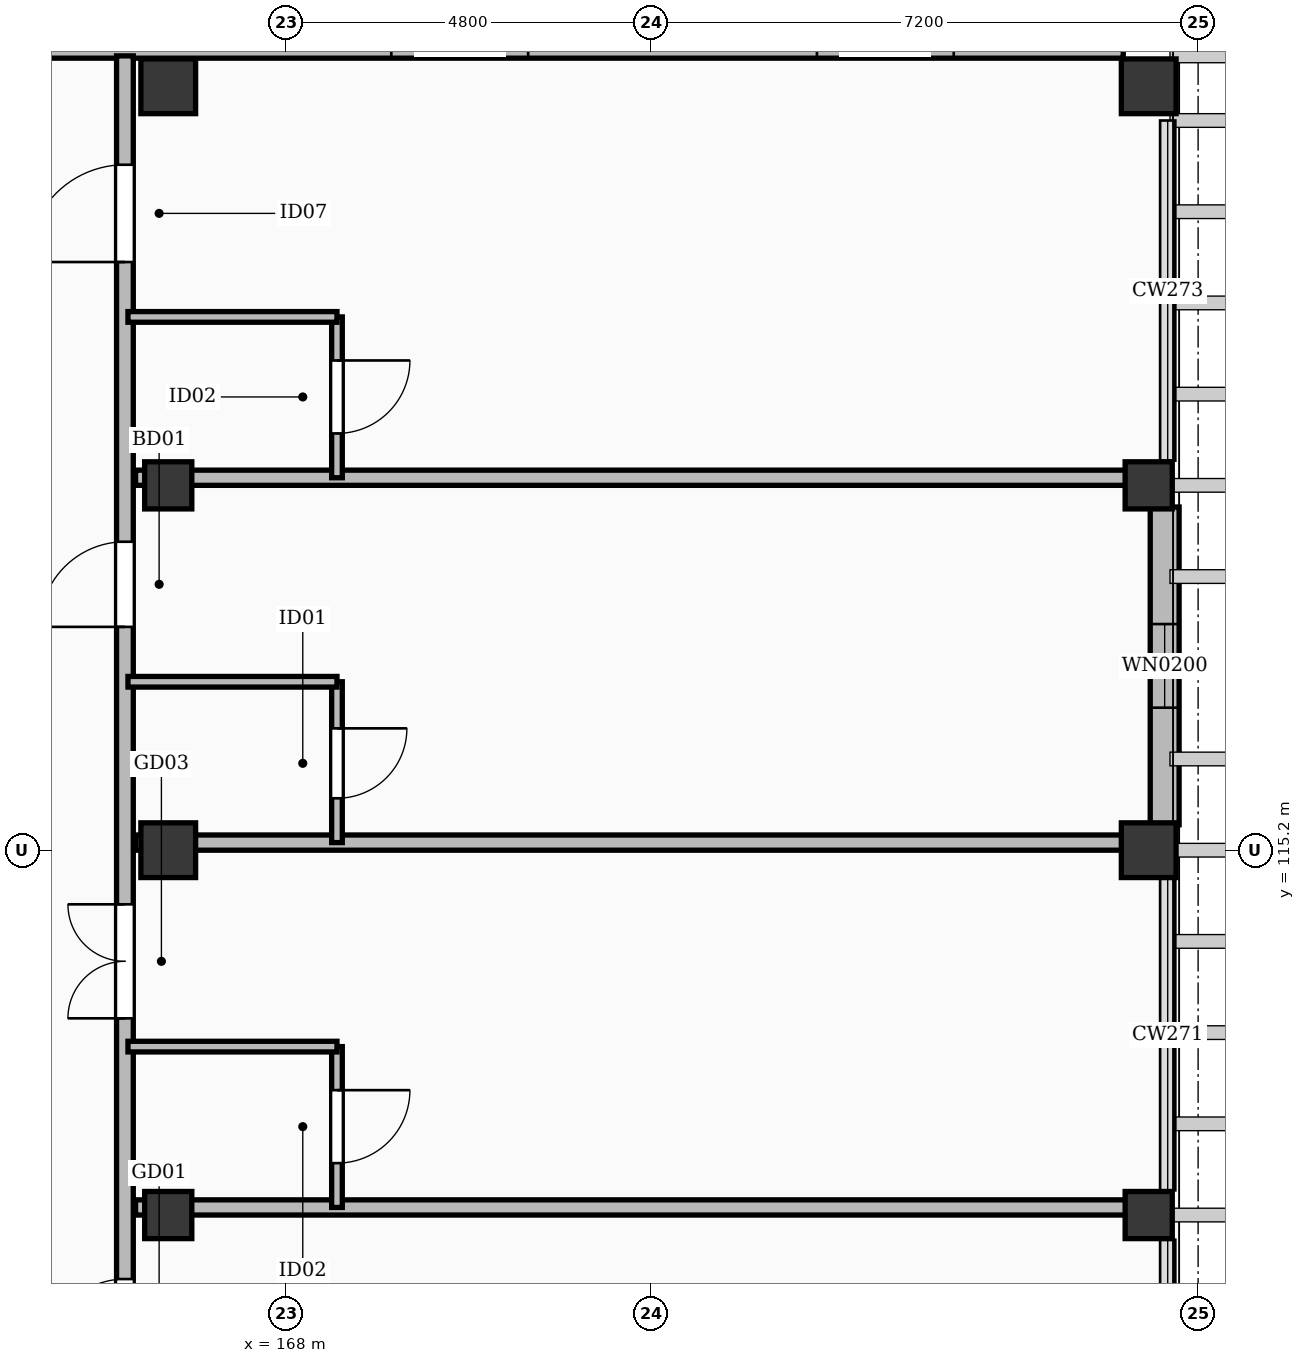
"""IFC4 building model, lengths in metres.
Left out: names, types, materials, properties, quantities, classifications, styles, units other than length and angle.
Written with IfcOpenShell. Run it as: python <this file> out.ifc"""

import sys

from ifc_helpers import new_model, si_unit, direction, frame, frame_2d, origin, origin_2d, place, context, subcontext, project, spatial, rectangle, extrude, element, fill, save


model = new_model("IFC4")
c1 = context("Model", 3, precision=1e-05, world=origin(), true_north=direction((0.0, 1.0)))
c2 = subcontext(c1, "Body", "Model", "MODEL_VIEW")
j1 = project(units=[si_unit("LENGTHUNIT", "METRE"), si_unit("PLANEANGLEUNIT", "RADIAN")], contexts=[c1])
p1 = place(None, origin())
s1 = spatial("IfcSite", under=j1, at=p1, CompositionType="ELEMENT")
p2 = place(p1, origin())
s2 = spatial("IfcBuilding", under=s1, at=p2, CompositionType="ELEMENT")
p3 = place(p2, frame((0.0, 0.0, 31.8)))
s3 = spatial("IfcBuildingStorey", under=s2, at=p3, CompositionType="ELEMENT", Elevation=31.8)
for number, where, z_axis, x_axis in (
    (1, (166.45, 115.2, 0.0), (0.0, 0.0, 1.0), (1.0, 0.0, 0.0)),
    (2, (166.45, 125.25, 0.0), (0.0, 0.0, 1.0), (1.0, 0.0, 0.0)),
    (3, (179.35, 115.2, 0.0), (0.0, 0.0, 1.0), (1.0, 0.0, 0.0)),
    (4, (179.35, 125.25, 0.0), (0.0, 0.0, 1.0), (1.0, 0.0, 0.0)),
):
    element("IfcColumn", number, at=place(p3, frame(where, z_axis=z_axis, x_axis=x_axis)), inside=s3, PredefinedType="COLUMN", context=c2, shape_type="SweptSolid", body=[
        extrude(rectangle(XDim=0.72, YDim=0.72, at=origin_2d()), origin(), (0.0, 0.0, 1.0), 3.6),
    ])
for number, where, z_axis, x_axis in (
    (5, (166.45, 110.4, 0.0), (0.0, 0.0, 1.0), (1.0, 0.0, 0.0)),
    (6, (166.45, 120.0, 0.0), (0.0, 0.0, 1.0), (1.0, 0.0, 0.0)),
    (7, (179.35, 110.4, 0.0), (0.0, 0.0, 1.0), (1.0, 0.0, 0.0)),
    (8, (179.35, 120.0, 0.0), (0.0, 0.0, 1.0), (1.0, 0.0, 0.0)),
):
    element("IfcColumn", number, at=place(p3, frame(where, z_axis=z_axis, x_axis=x_axis)), inside=s3, PredefinedType="COLUMN", context=c2, shape_type="SweptSolid", body=[
        extrude(rectangle(XDim=0.62, YDim=0.62, at=origin_2d()), origin(), (0.0, 0.0, 1.0), 3.6),
    ])
p4 = place(p3, frame((149.785, 125.81, 0.0), z_axis=(0.0, 0.0, 1.0), x_axis=(1.0, 0.0, 0.0)))
e9 = element("IfcWall", 9, at=p4, inside=s3, PredefinedType="SOLIDWALL", context=c2, shape_type="SweptSolid", body=[
    extrude(rectangle(XDim=29.23, YDim=0.38, at=frame_2d((14.615, 0.0))), origin(), (0.0, 0.0, 1.0), 3.36),
])
p5 = place(p4, frame((3.6, 0.0, 0.55)))
e10 = element("IfcOpeningElement", 10, at=p5, cuts=e9, PredefinedType="OPENING", context=c2, shape_type="SweptSolid", body=[
    extrude(rectangle(XDim=1.8, YDim=1.76, at=frame_2d((0.9, 0.88))), frame((0.0, 0.202, 0.0), z_axis=(0.0, -1.0, 0.0), x_axis=(1.0, 0.0, 0.0)), (0.0, 0.0, 1.0), 0.404),
])
p6 = place(p4, frame((9.2, 0.0, 0.55)))
e11 = element("IfcOpeningElement", 11, at=p6, cuts=e9, PredefinedType="OPENING", context=c2, shape_type="SweptSolid", body=[
    extrude(rectangle(XDim=1.8, YDim=1.76, at=frame_2d((0.9, 0.88))), frame((0.0, 0.202, 0.0), z_axis=(0.0, -1.0, 0.0), x_axis=(1.0, 0.0, 0.0)), (0.0, 0.0, 1.0), 0.404),
])
p7 = place(p4, frame((19.6, 0.0, 0.55)))
e12 = element("IfcOpeningElement", 12, at=p7, cuts=e9, PredefinedType="OPENING", context=c2, shape_type="SweptSolid", body=[
    extrude(rectangle(XDim=1.8, YDim=1.76, at=frame_2d((0.9, 0.88))), frame((0.0, 0.202, 0.0), z_axis=(0.0, -1.0, 0.0), x_axis=(1.0, 0.0, 0.0)), (0.0, 0.0, 1.0), 0.404),
])
p8 = place(p4, frame((25.2, 0.0, 0.55)))
e13 = element("IfcOpeningElement", 13, at=p8, cuts=e9, PredefinedType="OPENING", context=c2, shape_type="SweptSolid", body=[
    extrude(rectangle(XDim=1.8, YDim=1.76, at=frame_2d((0.9, 0.88))), frame((0.0, 0.202, 0.0), z_axis=(0.0, -1.0, 0.0), x_axis=(1.0, 0.0, 0.0)), (0.0, 0.0, 1.0), 0.404),
])
p9 = place(p3, frame((179.56, 119.715, 0.0), z_axis=(0.0, 0.0, 1.0), x_axis=(0.0, -1.0, 0.0)))
e14 = element("IfcWall", 14, at=p9, inside=s3, PredefinedType="SOLIDWALL", context=c2, shape_type="SweptSolid", body=[
    extrude(rectangle(XDim=4.18, YDim=0.38, at=frame_2d((2.09, 0.0))), origin(), (0.0, 0.0, 1.0), 2.602),
])
p10 = place(p9, frame((1.54, 0.0, 0.55)))
e15 = element("IfcOpeningElement", 15, at=p10, cuts=e14, PredefinedType="OPENING", context=c2, shape_type="SweptSolid", body=[
    extrude(rectangle(XDim=1.1, YDim=1.7, at=frame_2d((0.55, 0.85))), frame((0.0, 0.202, 0.0), z_axis=(0.0, -1.0, 0.0), x_axis=(1.0, 0.0, 0.0)), (0.0, 0.0, 1.0), 0.404),
])
p11 = place(p3, frame((165.88, 48.35, 0.0), z_axis=(0.0, 0.0, 1.0), x_axis=(0.0, 1.0, 0.0)))
e16 = element("IfcWall", 16, at=p11, inside=s3, PredefinedType="PARTITIONING", context=c2, shape_type="SweptSolid", body=[
    extrude(rectangle(XDim=77.3, YDim=0.22, at=frame_2d((38.65, 0.0))), origin(), (0.0, 0.0, 1.0), 2.602),
])
p12 = place(p11, frame((5.15, 0.0, 0.0)))
e17 = element("IfcOpeningElement", 17, at=p12, cuts=e16, PredefinedType="OPENING", context=c2, shape_type="SweptSolid", body=[
    extrude(rectangle(XDim=1.14, YDim=2.26, at=frame_2d((0.57, 1.13))), frame((0.0, 0.122, 0.0), z_axis=(0.0, -1.0, 0.0), x_axis=(1.0, 0.0, 0.0)), (0.0, 0.0, 1.0), 0.244),
])
p13 = place(p11, frame((12.188, 0.0, 0.0)))
e18 = element("IfcOpeningElement", 18, at=p13, cuts=e16, PredefinedType="OPENING", context=c2, shape_type="SweptSolid", body=[
    extrude(rectangle(XDim=1.12, YDim=2.15, at=frame_2d((0.56, 1.075))), frame((0.0, 0.122, 0.0), z_axis=(0.0, -1.0, 0.0), x_axis=(1.0, 0.0, 0.0)), (0.0, 0.0, 1.0), 0.244),
])
p14 = place(p11, frame((16.988, 0.0, 0.0)))
e19 = element("IfcOpeningElement", 19, at=p14, cuts=e16, PredefinedType="OPENING", context=c2, shape_type="SweptSolid", body=[
    extrude(rectangle(XDim=1.28, YDim=2.16, at=frame_2d((0.64, 1.08))), frame((0.0, 0.122, 0.0), z_axis=(0.0, -1.0, 0.0), x_axis=(1.0, 0.0, 0.0)), (0.0, 0.0, 1.0), 0.244),
])
p15 = place(p11, frame((21.788, 0.0, 0.0)))
e20 = element("IfcOpeningElement", 20, at=p15, cuts=e16, PredefinedType="OPENING", context=c2, shape_type="SweptSolid", body=[
    extrude(rectangle(XDim=1.05, YDim=2.18, at=frame_2d((0.525, 1.09))), frame((0.0, 0.122, 0.0), z_axis=(0.0, -1.0, 0.0), x_axis=(1.0, 0.0, 0.0)), (0.0, 0.0, 1.0), 0.244),
])
p16 = place(p11, frame((26.588, 0.0, 0.0)))
e21 = element("IfcOpeningElement", 21, at=p16, cuts=e16, PredefinedType="OPENING", context=c2, shape_type="SweptSolid", body=[
    extrude(rectangle(XDim=1.08, YDim=2.25, at=frame_2d((0.54, 1.125))), frame((0.0, 0.122, 0.0), z_axis=(0.0, -1.0, 0.0), x_axis=(1.0, 0.0, 0.0)), (0.0, 0.0, 1.0), 0.244),
])
p17 = place(p11, frame((31.388, 0.0, 0.0)))
e22 = element("IfcOpeningElement", 22, at=p17, cuts=e16, PredefinedType="OPENING", context=c2, shape_type="SweptSolid", body=[
    extrude(rectangle(XDim=1.02, YDim=2.2, at=frame_2d((0.51, 1.1))), frame((0.0, 0.122, 0.0), z_axis=(0.0, -1.0, 0.0), x_axis=(1.0, 0.0, 0.0)), (0.0, 0.0, 1.0), 0.244),
])
p18 = place(p11, frame((35.838, 0.0, 0.0)))
e23 = element("IfcOpeningElement", 23, at=p18, cuts=e16, PredefinedType="OPENING", context=c2, shape_type="SweptSolid", body=[
    extrude(rectangle(XDim=1.5, YDim=2.3, at=frame_2d((0.75, 1.15))), frame((0.0, 0.122, 0.0), z_axis=(0.0, -1.0, 0.0), x_axis=(1.0, 0.0, 0.0)), (0.0, 0.0, 1.0), 0.244),
])
p19 = place(p11, frame((40.988, 0.0, 0.0)))
e24 = element("IfcOpeningElement", 24, at=p19, cuts=e16, PredefinedType="OPENING", context=c2, shape_type="SweptSolid", body=[
    extrude(rectangle(XDim=1.12, YDim=2.15, at=frame_2d((0.56, 1.075))), frame((0.0, 0.122, 0.0), z_axis=(0.0, -1.0, 0.0), x_axis=(1.0, 0.0, 0.0)), (0.0, 0.0, 1.0), 0.244),
])
p20 = place(p11, frame((45.788, 0.0, 0.0)))
e25 = element("IfcOpeningElement", 25, at=p20, cuts=e16, PredefinedType="OPENING", context=c2, shape_type="SweptSolid", body=[
    extrude(rectangle(XDim=1.28, YDim=2.16, at=frame_2d((0.64, 1.08))), frame((0.0, 0.122, 0.0), z_axis=(0.0, -1.0, 0.0), x_axis=(1.0, 0.0, 0.0)), (0.0, 0.0, 1.0), 0.244),
])
p21 = place(p11, frame((50.588, 0.0, 0.0)))
e26 = element("IfcOpeningElement", 26, at=p21, cuts=e16, PredefinedType="OPENING", context=c2, shape_type="SweptSolid", body=[
    extrude(rectangle(XDim=1.05, YDim=2.18, at=frame_2d((0.525, 1.09))), frame((0.0, 0.122, 0.0), z_axis=(0.0, -1.0, 0.0), x_axis=(1.0, 0.0, 0.0)), (0.0, 0.0, 1.0), 0.244),
])
p22 = place(p11, frame((55.388, 0.0, 0.0)))
e27 = element("IfcOpeningElement", 27, at=p22, cuts=e16, PredefinedType="OPENING", context=c2, shape_type="SweptSolid", body=[
    extrude(rectangle(XDim=1.08, YDim=2.25, at=frame_2d((0.54, 1.125))), frame((0.0, 0.122, 0.0), z_axis=(0.0, -1.0, 0.0), x_axis=(1.0, 0.0, 0.0)), (0.0, 0.0, 1.0), 0.244),
])
p23 = place(p11, frame((60.188, 0.0, 0.0)))
e28 = element("IfcOpeningElement", 28, at=p23, cuts=e16, PredefinedType="OPENING", context=c2, shape_type="SweptSolid", body=[
    extrude(rectangle(XDim=1.02, YDim=2.2, at=frame_2d((0.51, 1.1))), frame((0.0, 0.122, 0.0), z_axis=(0.0, -1.0, 0.0), x_axis=(1.0, 0.0, 0.0)), (0.0, 0.0, 1.0), 0.244),
])
p24 = place(p11, frame((64.638, 0.0, 0.0)))
e29 = element("IfcOpeningElement", 29, at=p24, cuts=e16, PredefinedType="OPENING", context=c2, shape_type="SweptSolid", body=[
    extrude(rectangle(XDim=1.5, YDim=2.3, at=frame_2d((0.75, 1.15))), frame((0.0, 0.122, 0.0), z_axis=(0.0, -1.0, 0.0), x_axis=(1.0, 0.0, 0.0)), (0.0, 0.0, 1.0), 0.244),
])
p25 = place(p11, frame((69.788, 0.0, 0.0)))
e30 = element("IfcOpeningElement", 30, at=p25, cuts=e16, PredefinedType="OPENING", context=c2, shape_type="SweptSolid", body=[
    extrude(rectangle(XDim=1.12, YDim=2.15, at=frame_2d((0.56, 1.075))), frame((0.0, 0.122, 0.0), z_axis=(0.0, -1.0, 0.0), x_axis=(1.0, 0.0, 0.0)), (0.0, 0.0, 1.0), 0.244),
])
p26 = place(p11, frame((74.588, 0.0, 0.0)))
e31 = element("IfcOpeningElement", 31, at=p26, cuts=e16, PredefinedType="OPENING", context=c2, shape_type="SweptSolid", body=[
    extrude(rectangle(XDim=1.28, YDim=2.16, at=frame_2d((0.64, 1.08))), frame((0.0, 0.122, 0.0), z_axis=(0.0, -1.0, 0.0), x_axis=(1.0, 0.0, 0.0)), (0.0, 0.0, 1.0), 0.244),
])
p27 = place(p3, frame((166.02, 110.5, 0.0), z_axis=(0.0, 0.0, 1.0), x_axis=(1.0, 0.0, 0.0)))
e32 = element("IfcWall", 32, at=p27, inside=s3, PredefinedType="PARTITIONING", context=c2, shape_type="SweptSolid", body=[
    extrude(rectangle(XDim=13.23, YDim=0.2, at=frame_2d((6.615, 0.0))), origin(), (0.0, 0.0, 1.0), 2.602),
])
p28 = place(p3, frame((168.67, 110.5, 0.0), z_axis=(0.0, 0.0, 1.0), x_axis=(0.0, 1.0, 0.0)))
e33 = element("IfcWall", 33, at=p28, inside=s3, PredefinedType="PARTITIONING", context=c2, shape_type="SweptSolid", body=[
    extrude(rectangle(XDim=2.116, YDim=0.14, at=frame_2d((1.058, 0.0))), origin(), (0.0, 0.0, 1.0), 2.732),
])
p29 = place(p28, frame((0.583, 0.0, 0.0)))
e34 = element("IfcOpeningElement", 34, at=p29, cuts=e33, PredefinedType="OPENING", context=c2, shape_type="SweptSolid", body=[
    extrude(rectangle(XDim=0.96, YDim=2.12, at=frame_2d((0.48, 1.06))), frame((0.0, 0.082, 0.0), z_axis=(0.0, -1.0, 0.0), x_axis=(1.0, 0.0, 0.0)), (0.0, 0.0, 1.0), 0.164),
])
p30 = place(p3, frame((165.92, 112.616, 0.0), z_axis=(0.0, 0.0, 1.0), x_axis=(1.0, 0.0, 0.0)))
e35 = element("IfcWall", 35, at=p30, inside=s3, PredefinedType="PARTITIONING", context=c2, shape_type="SweptSolid", body=[
    extrude(rectangle(XDim=2.75, YDim=0.14, at=frame_2d((1.375, 0.0))), origin(), (0.0, 0.0, 1.0), 2.732),
])
p31 = place(p3, frame((166.02, 115.3, 0.0), z_axis=(0.0, 0.0, 1.0), x_axis=(1.0, 0.0, 0.0)))
e36 = element("IfcWall", 36, at=p31, inside=s3, PredefinedType="PARTITIONING", context=c2, shape_type="SweptSolid", body=[
    extrude(rectangle(XDim=13.23, YDim=0.2, at=frame_2d((6.615, 0.0))), origin(), (0.0, 0.0, 1.0), 2.602),
])
p32 = place(p3, frame((168.67, 115.3, 0.0), z_axis=(0.0, 0.0, 1.0), x_axis=(0.0, 1.0, 0.0)))
e37 = element("IfcWall", 37, at=p32, inside=s3, PredefinedType="PARTITIONING", context=c2, shape_type="SweptSolid", body=[
    extrude(rectangle(XDim=2.116, YDim=0.14, at=frame_2d((1.058, 0.0))), origin(), (0.0, 0.0, 1.0), 2.732),
])
p33 = place(p32, frame((0.583, 0.0, 0.0)))
e38 = element("IfcOpeningElement", 38, at=p33, cuts=e37, PredefinedType="OPENING", context=c2, shape_type="SweptSolid", body=[
    extrude(rectangle(XDim=0.92, YDim=2.1, at=frame_2d((0.46, 1.05))), frame((0.0, 0.082, 0.0), z_axis=(0.0, -1.0, 0.0), x_axis=(1.0, 0.0, 0.0)), (0.0, 0.0, 1.0), 0.164),
])
p34 = place(p3, frame((165.92, 117.416, 0.0), z_axis=(0.0, 0.0, 1.0), x_axis=(1.0, 0.0, 0.0)))
e39 = element("IfcWall", 39, at=p34, inside=s3, PredefinedType="PARTITIONING", context=c2, shape_type="SweptSolid", body=[
    extrude(rectangle(XDim=2.75, YDim=0.14, at=frame_2d((1.375, 0.0))), origin(), (0.0, 0.0, 1.0), 2.732),
])
p35 = place(p3, frame((166.02, 120.1, 0.0), z_axis=(0.0, 0.0, 1.0), x_axis=(1.0, 0.0, 0.0)))
e40 = element("IfcWall", 40, at=p35, inside=s3, PredefinedType="PARTITIONING", context=c2, shape_type="SweptSolid", body=[
    extrude(rectangle(XDim=13.23, YDim=0.2, at=frame_2d((6.615, 0.0))), origin(), (0.0, 0.0, 1.0), 2.602),
])
p36 = place(p3, frame((168.67, 120.1, 0.0), z_axis=(0.0, 0.0, 1.0), x_axis=(0.0, 1.0, 0.0)))
e41 = element("IfcWall", 41, at=p36, inside=s3, PredefinedType="PARTITIONING", context=c2, shape_type="SweptSolid", body=[
    extrude(rectangle(XDim=2.116, YDim=0.14, at=frame_2d((1.058, 0.0))), origin(), (0.0, 0.0, 1.0), 2.732),
])
p37 = place(p36, frame((0.583, 0.0, 0.0)))
e42 = element("IfcOpeningElement", 42, at=p37, cuts=e41, PredefinedType="OPENING", context=c2, shape_type="SweptSolid", body=[
    extrude(rectangle(XDim=0.96, YDim=2.12, at=frame_2d((0.48, 1.06))), frame((0.0, 0.082, 0.0), z_axis=(0.0, -1.0, 0.0), x_axis=(1.0, 0.0, 0.0)), (0.0, 0.0, 1.0), 0.164),
])
p38 = place(p3, frame((165.92, 122.216, 0.0), z_axis=(0.0, 0.0, 1.0), x_axis=(1.0, 0.0, 0.0)))
e43 = element("IfcWall", 43, at=p38, inside=s3, PredefinedType="PARTITIONING", context=c2, shape_type="SweptSolid", body=[
    extrude(rectangle(XDim=2.75, YDim=0.14, at=frame_2d((1.375, 0.0))), origin(), (0.0, 0.0, 1.0), 2.732),
])
p39 = place(p10, origin())
e44 = element("IfcWindow", 44, at=p39, inside=s3, PartitioningType="SINGLE_PANEL", PredefinedType="WINDOW", context=c2, shape_type="SweptSolid", body=[
    extrude(rectangle(XDim=1.1, YDim=1.7, at=frame_2d((0.55, 0.85))), frame((0.0, 0.03, 0.0), z_axis=(0.0, -1.0, 0.0), x_axis=(1.0, 0.0, 0.0)), (0.0, 0.0, 1.0), 0.06),
])
fill(e15, e44)
p40 = place(p23, origin())
e45 = element("IfcDoor", 45, at=p40, inside=s3, OperationType="SINGLE_SWING_LEFT", PredefinedType="DOOR", context=c2, shape_type="SweptSolid", body=[
    extrude(rectangle(XDim=1.02, YDim=2.2, at=frame_2d((0.51, 1.1))), frame((0.0, 0.025, 0.0), z_axis=(0.0, -1.0, 0.0), x_axis=(1.0, 0.0, 0.0)), (0.0, 0.0, 1.0), 0.05),
])
fill(e28, e45)
p41 = place(p24, origin())
e46 = element("IfcDoor", 46, at=p41, inside=s3, OperationType="DOUBLE_DOOR_SINGLE_SWING", PredefinedType="DOOR", context=c2, shape_type="SweptSolid", body=[
    extrude(rectangle(XDim=1.5, YDim=2.3, at=frame_2d((0.75, 1.15))), frame((0.0, 0.025, 0.0), z_axis=(0.0, -1.0, 0.0), x_axis=(1.0, 0.0, 0.0)), (0.0, 0.0, 1.0), 0.05),
])
fill(e29, e46)
p42 = place(p29, frame((0.96, 0.0, 0.0), z_axis=(0.0, 0.0, 1.0), x_axis=(-1.0, 0.0, 0.0)))
e47 = element("IfcDoor", 47, at=p42, inside=s3, OperationType="SINGLE_SWING_RIGHT", PredefinedType="DOOR", context=c2, shape_type="SweptSolid", body=[
    extrude(rectangle(XDim=0.96, YDim=2.12, at=frame_2d((0.48, 1.06))), frame((0.0, 0.025, 0.0), z_axis=(0.0, -1.0, 0.0), x_axis=(1.0, 0.0, 0.0)), (0.0, 0.0, 1.0), 0.05),
])
fill(e34, e47)
p43 = place(p25, origin())
e48 = element("IfcDoor", 48, at=p43, inside=s3, OperationType="SINGLE_SWING_LEFT", PredefinedType="DOOR", context=c2, shape_type="SweptSolid", body=[
    extrude(rectangle(XDim=1.12, YDim=2.15, at=frame_2d((0.56, 1.075))), frame((0.0, 0.025, 0.0), z_axis=(0.0, -1.0, 0.0), x_axis=(1.0, 0.0, 0.0)), (0.0, 0.0, 1.0), 0.05),
])
fill(e30, e48)
p44 = place(p33, frame((0.92, 0.0, 0.0), z_axis=(0.0, 0.0, 1.0), x_axis=(-1.0, 0.0, 0.0)))
e49 = element("IfcDoor", 49, at=p44, inside=s3, OperationType="SINGLE_SWING_RIGHT", PredefinedType="DOOR", context=c2, shape_type="SweptSolid", body=[
    extrude(rectangle(XDim=0.92, YDim=2.1, at=frame_2d((0.46, 1.05))), frame((0.0, 0.025, 0.0), z_axis=(0.0, -1.0, 0.0), x_axis=(1.0, 0.0, 0.0)), (0.0, 0.0, 1.0), 0.05),
])
fill(e38, e49)
p45 = place(p26, origin())
e50 = element("IfcDoor", 50, at=p45, inside=s3, OperationType="SINGLE_SWING_LEFT", PredefinedType="DOOR", context=c2, shape_type="SweptSolid", body=[
    extrude(rectangle(XDim=1.28, YDim=2.16, at=frame_2d((0.64, 1.08))), frame((0.0, 0.025, 0.0), z_axis=(0.0, -1.0, 0.0), x_axis=(1.0, 0.0, 0.0)), (0.0, 0.0, 1.0), 0.05),
])
fill(e31, e50)
p46 = place(p37, frame((0.96, 0.0, 0.0), z_axis=(0.0, 0.0, 1.0), x_axis=(-1.0, 0.0, 0.0)))
e51 = element("IfcDoor", 51, at=p46, inside=s3, OperationType="SINGLE_SWING_RIGHT", PredefinedType="DOOR", context=c2, shape_type="SweptSolid", body=[
    extrude(rectangle(XDim=0.96, YDim=2.12, at=frame_2d((0.48, 1.06))), frame((0.0, 0.025, 0.0), z_axis=(0.0, -1.0, 0.0), x_axis=(1.0, 0.0, 0.0)), (0.0, 0.0, 1.0), 0.05),
])
fill(e42, e51)
save(model, sys.argv[1])
